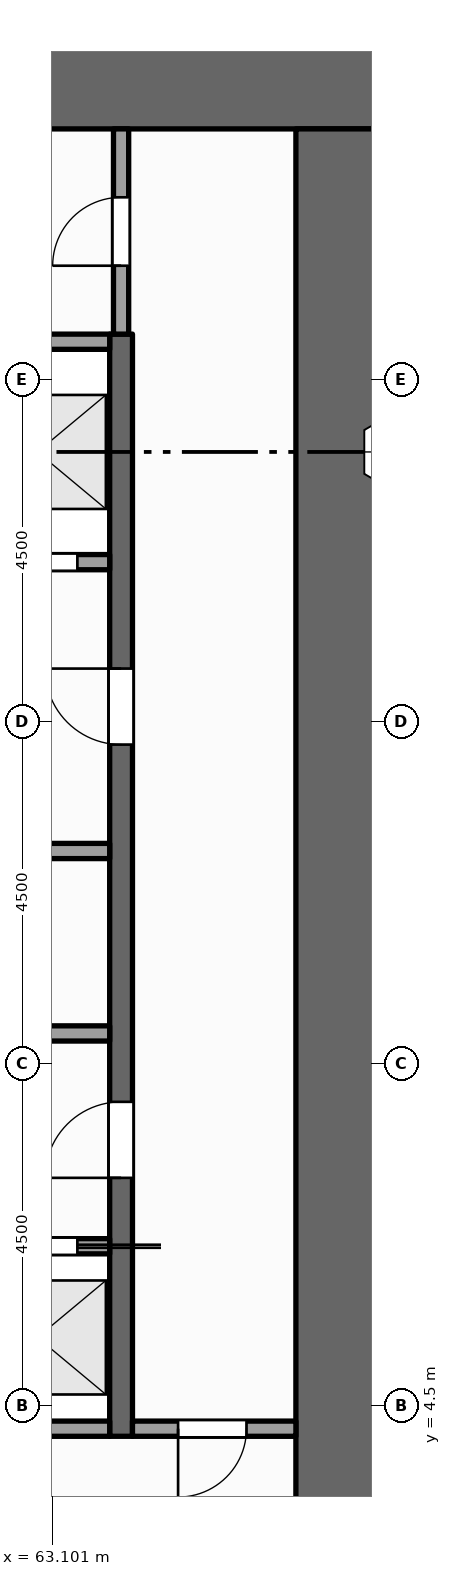
"""IFC4 building model, lengths in metres.
Left out: names, types, materials, properties, quantities, classifications, styles, units other than length and angle.
Written with IfcOpenShell. Run it as: python <this file> out.ifc"""

import sys

from ifc_helpers import new_model, si_unit, direction, frame, frame_2d, origin, place, context, subcontext, project, spatial, rectangle, extrude, element, fill, save


model = new_model("IFC4")
c1 = context("Model", 3, precision=1e-05, world=origin(), true_north=direction((0.0, 1.0)))
c2 = subcontext(c1, "Body", "Model", "MODEL_VIEW")
j1 = project(units=[si_unit("LENGTHUNIT", "METRE"), si_unit("PLANEANGLEUNIT", "RADIAN")], contexts=[c1])
p1 = place(None, origin())
s1 = spatial("IfcSite", under=j1, at=p1, CompositionType="ELEMENT")
p2 = place(p1, origin())
s2 = spatial("IfcBuilding", under=s1, at=p2, CompositionType="ELEMENT")
p3 = place(p2, frame((0.0, 0.0, 41.0)))
s3 = spatial("IfcBuildingStorey", under=s2, at=p3, CompositionType="ELEMENT", Elevation=41.0)
p4 = place(p3, frame((54.0, 21.9, -0.15), z_axis=(0.0, 0.0, 1.0), x_axis=(1.0, 0.0, 0.0)))
e1 = element("IfcWall", 1, at=p4, inside=s3, PredefinedType="SHEAR", context=c2, shape_type="SweptSolid", body=[
    extrude(rectangle(XDim=13.5, YDim=1.2, at=frame_2d((6.75, 0.0))), origin(), (0.0, 0.0, 1.0), 4.0),
])
p5 = place(p3, frame((66.9, 1.2, -0.15), z_axis=(0.0, 0.0, 1.0), x_axis=(0.0, 1.0, 0.0)))
e2 = element("IfcWall", 2, at=p5, inside=s3, PredefinedType="SHEAR", context=c2, shape_type="SweptSolid", body=[
    extrude(rectangle(XDim=20.1, YDim=1.2, at=frame_2d((10.05, 0.0))), origin(), (0.0, 0.0, 1.0), 4.0),
])
p6 = place(p3, frame((64.0, 4.1, 0.0), z_axis=(0.0, 0.0, 1.0), x_axis=(0.0, 1.0, 0.0)))
e3 = element("IfcWall", 3, at=p6, inside=s3, PredefinedType="SHEAR", context=c2, shape_type="SweptSolid", body=[
    extrude(rectangle(XDim=14.5, YDim=0.3, at=frame_2d((7.25, 0.0))), origin(), (0.0, 0.0, 1.0), 3.85),
])
p7 = place(p6, frame((3.4, 0.0, 0.0)))
e4 = element("IfcOpeningElement", 4, at=p7, cuts=e3, PredefinedType="OPENING", context=c2, shape_type="SweptSolid", body=[
    extrude(rectangle(XDim=1.0, YDim=2.1, at=frame_2d((0.5, 1.05))), frame((0.0, 0.16, 0.0), z_axis=(0.0, -1.0, 0.0), x_axis=(1.0, 0.0, 0.0)), (0.0, 0.0, 1.0), 0.32),
])
p8 = place(p6, frame((9.1, 0.0, 0.0)))
e5 = element("IfcOpeningElement", 5, at=p8, cuts=e3, PredefinedType="OPENING", context=c2, shape_type="SweptSolid", body=[
    extrude(rectangle(XDim=1.0, YDim=2.1, at=frame_2d((0.5, 1.05))), frame((0.0, 0.16, 0.0), z_axis=(0.0, -1.0, 0.0), x_axis=(1.0, 0.0, 0.0)), (0.0, 0.0, 1.0), 0.32),
])
p9 = place(p3, frame((64.0, 18.6, 0.0), z_axis=(0.0, 0.0, 1.0), x_axis=(0.0, 1.0, 0.0)))
e6 = element("IfcWall", 6, at=p9, inside=s3, PredefinedType="PARTITIONING", context=c2, shape_type="SweptSolid", body=[
    extrude(rectangle(XDim=2.7, YDim=0.2, at=frame_2d((1.35, 0.0))), origin(), (0.0, 0.0, 1.0), 3.85),
])
p10 = place(p9, frame((0.9, 0.0, 0.0)))
e7 = element("IfcOpeningElement", 7, at=p10, cuts=e6, PredefinedType="OPENING", context=c2, shape_type="SweptSolid", body=[
    extrude(rectangle(XDim=0.9, YDim=2.1, at=frame_2d((0.45, 1.05))), frame((0.0, 0.11, 0.0), z_axis=(0.0, -1.0, 0.0), x_axis=(1.0, 0.0, 0.0)), (0.0, 0.0, 1.0), 0.22),
])
p11 = place(p3, frame((61.9, 4.2, 0.0), z_axis=(0.0, 0.0, 1.0), x_axis=(1.0, 0.0, 0.0)))
e8 = element("IfcWall", 8, at=p11, inside=s3, PredefinedType="SOLIDWALL", context=c2, shape_type="SweptSolid", body=[
    extrude(rectangle(XDim=1.95, YDim=0.2, at=frame_2d((0.975, 0.0))), origin(), (0.0, 0.0, 1.0), 3.85),
])
p12 = place(p3, frame((64.15, 4.2, 0.0), z_axis=(0.0, 0.0, 1.0), x_axis=(1.0, 0.0, 0.0)))
e9 = element("IfcWall", 9, at=p12, inside=s3, PredefinedType="PARTITIONING", context=c2, shape_type="SweptSolid", body=[
    extrude(rectangle(XDim=2.15, YDim=0.2, at=frame_2d((1.075, 0.0))), origin(), (0.0, 0.0, 1.0), 3.85),
])
p13 = place(p12, frame((0.6, 0.0, 0.0)))
e10 = element("IfcOpeningElement", 10, at=p13, cuts=e9, PredefinedType="OPENING", context=c2, shape_type="SweptSolid", body=[
    extrude(rectangle(XDim=0.9, YDim=2.1, at=frame_2d((0.45, 1.05))), frame((0.0, 0.11, 0.0), z_axis=(0.0, -1.0, 0.0), x_axis=(1.0, 0.0, 0.0)), (0.0, 0.0, 1.0), 0.22),
])
p14 = place(p3, frame((61.9, 6.6, 0.0), z_axis=(0.0, 0.0, 1.0), x_axis=(1.0, 0.0, 0.0)))
e11 = element("IfcWall", 11, at=p14, inside=s3, PredefinedType="SOLIDWALL", context=c2, shape_type="SweptSolid", body=[
    extrude(rectangle(XDim=1.95, YDim=0.2, at=frame_2d((0.975, 0.0))), origin(), (0.0, 0.0, 1.0), 3.85),
])
p15 = place(p14, frame((0.425, 0.0, 0.012)))
e12 = element("IfcOpeningElement", 12, at=p15, cuts=e11, PredefinedType="OPENING", context=c2, shape_type="SweptSolid", body=[
    extrude(rectangle(XDim=1.1, YDim=2.1, at=frame_2d((0.55, 1.05))), frame((0.0, 0.11, 0.0), z_axis=(0.0, -1.0, 0.0), x_axis=(1.0, 0.0, 0.0)), (0.0, 0.0, 1.0), 0.22),
])
p16 = place(p3, frame((59.7, 9.4, 0.0), z_axis=(0.0, 0.0, 1.0), x_axis=(1.0, 0.0, 0.0)))
e13 = element("IfcWall", 13, at=p16, inside=s3, PredefinedType="PARTITIONING", context=c2, shape_type="SweptSolid", body=[
    extrude(rectangle(XDim=4.15, YDim=0.2, at=frame_2d((2.075, 0.0))), origin(), (0.0, 0.0, 1.0), 3.85),
])
p17 = place(p16, frame((1.625, 0.0, 0.0)))
e14 = element("IfcOpeningElement", 14, at=p17, cuts=e13, PredefinedType="OPENING", context=c2, shape_type="SweptSolid", body=[
    extrude(rectangle(XDim=0.9, YDim=2.1, at=frame_2d((0.45, 1.05))), frame((0.0, 0.11, 0.0), z_axis=(0.0, -1.0, 0.0), x_axis=(1.0, 0.0, 0.0)), (0.0, 0.0, 1.0), 0.22),
])
p18 = place(p3, frame((59.7, 11.8, 0.0), z_axis=(0.0, 0.0, 1.0), x_axis=(1.0, 0.0, 0.0)))
e15 = element("IfcWall", 15, at=p18, inside=s3, PredefinedType="PARTITIONING", context=c2, shape_type="SweptSolid", body=[
    extrude(rectangle(XDim=4.15, YDim=0.2, at=frame_2d((2.075, 0.0))), origin(), (0.0, 0.0, 1.0), 3.85),
])
p19 = place(p3, frame((61.9, 15.6, 0.0), z_axis=(0.0, 0.0, 1.0), x_axis=(1.0, 0.0, 0.0)))
e16 = element("IfcWall", 16, at=p19, inside=s3, PredefinedType="SOLIDWALL", context=c2, shape_type="SweptSolid", body=[
    extrude(rectangle(XDim=1.95, YDim=0.2, at=frame_2d((0.975, 0.0))), origin(), (0.0, 0.0, 1.0), 3.85),
])
p20 = place(p19, frame((0.425, 0.0, 0.012)))
e17 = element("IfcOpeningElement", 17, at=p20, cuts=e16, PredefinedType="OPENING", context=c2, shape_type="SweptSolid", body=[
    extrude(rectangle(XDim=1.1, YDim=2.1, at=frame_2d((0.55, 1.05))), frame((0.0, 0.11, 0.0), z_axis=(0.0, -1.0, 0.0), x_axis=(1.0, 0.0, 0.0)), (0.0, 0.0, 1.0), 0.22),
])
p21 = place(p3, frame((61.9, 18.5, 0.0), z_axis=(0.0, 0.0, 1.0), x_axis=(1.0, 0.0, 0.0)))
e18 = element("IfcWall", 18, at=p21, inside=s3, PredefinedType="SOLIDWALL", context=c2, shape_type="SweptSolid", body=[
    extrude(rectangle(XDim=1.95, YDim=0.2, at=frame_2d((0.975, 0.0))), origin(), (0.0, 0.0, 1.0), 3.85),
])
p22 = place(p15, origin())
e19 = element("IfcDoor", 19, at=p22, inside=s3, OperationType="SLIDING_TO_RIGHT", PredefinedType="DOOR", context=c2, shape_type="SweptSolid", body=[
    extrude(rectangle(XDim=1.1, YDim=2.1, at=frame_2d((0.55, 1.05))), frame((0.0, 0.025, 0.0), z_axis=(0.0, -1.0, 0.0), x_axis=(1.0, 0.0, 0.0)), (0.0, 0.0, 1.0), 0.05),
])
fill(e12, e19)
p23 = place(p20, origin())
e20 = element("IfcDoor", 20, at=p23, inside=s3, OperationType="SLIDING_TO_LEFT", PredefinedType="DOOR", context=c2, shape_type="SweptSolid", body=[
    extrude(rectangle(XDim=1.1, YDim=2.1, at=frame_2d((0.55, 1.05))), frame((0.0, 0.025, 0.0), z_axis=(0.0, -1.0, 0.0), x_axis=(1.0, 0.0, 0.0)), (0.0, 0.0, 1.0), 0.05),
])
fill(e17, e20)
p24 = place(p7, origin())
e21 = element("IfcDoor", 21, at=p24, inside=s3, OperationType="SINGLE_SWING_LEFT", PredefinedType="DOOR", context=c2, shape_type="SweptSolid", body=[
    extrude(rectangle(XDim=1.0, YDim=2.1, at=frame_2d((0.5, 1.05))), frame((0.0, 0.025, 0.0), z_axis=(0.0, -1.0, 0.0), x_axis=(1.0, 0.0, 0.0)), (0.0, 0.0, 1.0), 0.05),
])
fill(e4, e21)
p25 = place(p8, origin())
e22 = element("IfcDoor", 22, at=p25, inside=s3, OperationType="SINGLE_SWING_RIGHT", PredefinedType="DOOR", context=c2, shape_type="SweptSolid", body=[
    extrude(rectangle(XDim=1.0, YDim=2.1, at=frame_2d((0.5, 1.05))), frame((0.0, 0.025, 0.0), z_axis=(0.0, -1.0, 0.0), x_axis=(1.0, 0.0, 0.0)), (0.0, 0.0, 1.0), 0.05),
])
fill(e5, e22)
p26 = place(p13, origin())
e23 = element("IfcDoor", 23, at=p26, inside=s3, OperationType="SINGLE_SWING_LEFT", PredefinedType="DOOR", context=c2, shape_type="SweptSolid", body=[
    extrude(rectangle(XDim=0.9, YDim=2.1, at=frame_2d((0.45, 1.05))), frame((0.0, 0.025, 0.0), z_axis=(0.0, -1.0, 0.0), x_axis=(1.0, 0.0, 0.0)), (0.0, 0.0, 1.0), 0.05),
])
fill(e10, e23)
p27 = place(p10, origin())
e24 = element("IfcDoor", 24, at=p27, inside=s3, OperationType="SINGLE_SWING_LEFT", PredefinedType="DOOR", context=c2, shape_type="SweptSolid", body=[
    extrude(rectangle(XDim=0.9, YDim=2.1, at=frame_2d((0.45, 1.05))), frame((0.0, 0.025, 0.0), z_axis=(0.0, -1.0, 0.0), x_axis=(1.0, 0.0, 0.0)), (0.0, 0.0, 1.0), 0.05),
])
fill(e7, e24)
save(model, sys.argv[1])
